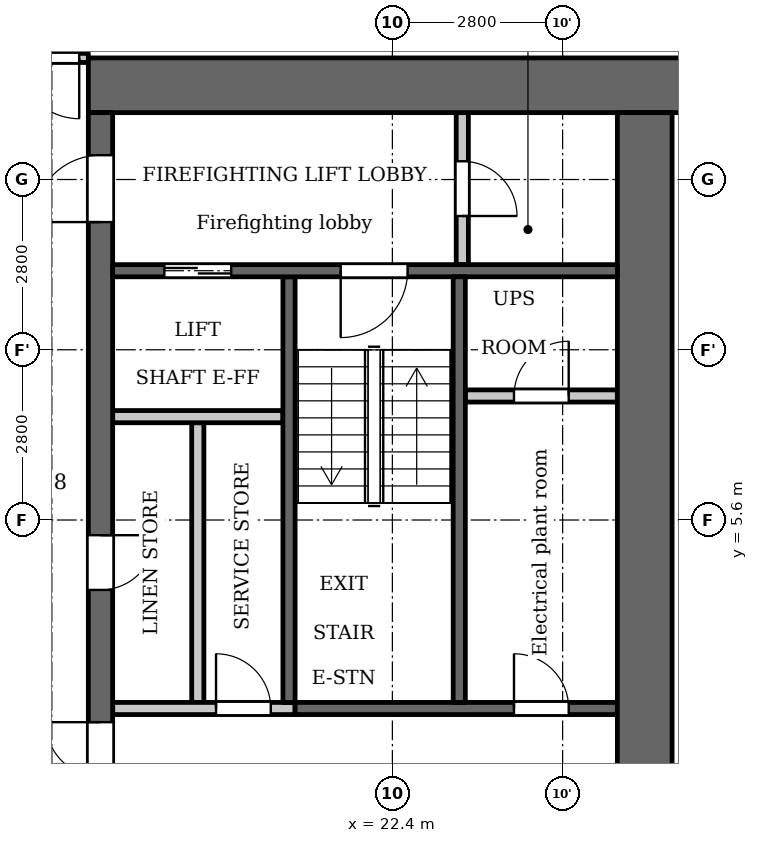
"""IFC4 building model, lengths in metres.
Left out: names, types, materials, properties, quantities, classifications, styles, units other than length and angle.
Written with IfcOpenShell. Run it as: python <this file> out.ifc"""

import sys

from ifc_helpers import new_model, si_unit, direction, frame, frame_2d, origin, place, context, subcontext, project, spatial, rectangle, extrude, element, fill, save


model = new_model("IFC4")
c1 = context("Model", 3, precision=1e-05, world=origin(), true_north=direction((0.0, 1.0)))
c2 = subcontext(c1, "Body", "Model", "MODEL_VIEW")
j1 = project(units=[si_unit("LENGTHUNIT", "METRE"), si_unit("PLANEANGLEUNIT", "RADIAN")], contexts=[c1])
p1 = place(None, origin())
s1 = spatial("IfcSite", under=j1, at=p1, CompositionType="ELEMENT")
p2 = place(p1, origin())
s2 = spatial("IfcBuilding", under=s1, at=p2, CompositionType="ELEMENT")
p3 = place(p2, frame((0.0, 0.0, 107.8)))
s3 = spatial("IfcBuildingStorey", under=s2, at=p3, CompositionType="ELEMENT", Elevation=107.8)
p4 = place(p3, frame((20.7, 2.6, 0.0), z_axis=(0.0, 0.0, 1.0), x_axis=(0.0, 1.0, 0.0)))
e1 = element("IfcWall", 1, at=p4, inside=s3, PredefinedType="SHEAR", context=c2, shape_type="SweptSolid", body=[
    extrude(rectangle(XDim=7.0, YDim=0.2, at=frame_2d((3.5, 0.0))), origin(), (0.0, 0.0, 1.0), 3.2),
])
p5 = place(p3, frame((20.8, 2.5, 0.0), z_axis=(0.0, 0.0, 1.0), x_axis=(1.0, 0.0, 0.0)))
e2 = element("IfcWall", 2, at=p5, inside=s3, PredefinedType="SHEAR", context=c2, shape_type="SweptSolid", body=[
    extrude(rectangle(XDim=5.3, YDim=0.2, at=frame_2d((2.65, 0.0))), origin(), (0.0, 0.0, 1.0), 3.2),
])
p6 = place(p5, frame((3.6, 0.0, 0.0)))
e3 = element("IfcOpeningElement", 3, at=p6, cuts=e2, PredefinedType="OPENING", context=c2, shape_type="SweptSolid", body=[
    extrude(rectangle(XDim=0.9, YDim=2.1, at=frame_2d((0.45, 1.05))), frame((0.0, 0.11, 0.0), z_axis=(0.0, -1.0, 0.0), x_axis=(1.0, 0.0, 0.0)), (0.0, 0.0, 1.0), 0.22),
])
p7 = place(p3, frame((17.4, 12.75, 0.0), z_axis=(0.0, 0.0, 1.0), x_axis=(1.0, 0.0, 0.0)))
e4 = element("IfcWall", 4, at=p7, inside=s3, PredefinedType="SHEAR", context=c2, shape_type="SweptSolid", body=[
    extrude(rectangle(XDim=10.4, YDim=0.9, at=frame_2d((5.2, 0.0))), origin(), (0.0, 0.0, 1.0), 3.2),
])
p8 = place(p3, frame((19.2, 2.6, 0.0), z_axis=(0.0, 0.0, 1.0), x_axis=(0.0, 1.0, 0.0)))
e5 = element("IfcWall", 5, at=p8, inside=s3, PredefinedType="PARTITIONING", context=c2, shape_type="SweptSolid", body=[
    extrude(rectangle(XDim=4.6, YDim=0.2, at=frame_2d((2.3, 0.0))), origin(), (0.0, 0.0, 1.0), 3.2),
])
p9 = place(p3, frame((17.6, -12.3, 0.0), z_axis=(0.0, 0.0, 1.0), x_axis=(0.0, 1.0, 0.0)))
e6 = element("IfcWall", 6, at=p9, inside=s3, PredefinedType="SHEAR", context=c2, shape_type="SweptSolid", body=[
    extrude(rectangle(XDim=24.6, YDim=0.4, at=frame_2d((12.3, 0.0))), origin(), (0.0, 0.0, 1.0), 3.2),
])
p10 = place(p9, frame((6.0, 0.0, 0.0)))
e7 = element("IfcOpeningElement", 7, at=p10, cuts=e6, PredefinedType="OPENING", context=c2, shape_type="SweptSolid", body=[
    extrude(rectangle(XDim=1.1, YDim=2.1, at=frame_2d((0.55, 1.05))), frame((0.0, 0.21, 0.0), z_axis=(0.0, -1.0, 0.0), x_axis=(1.0, 0.0, 0.0)), (0.0, 0.0, 1.0), 0.42),
])
p11 = place(p9, frame((8.4, 0.0, 0.0)))
e8 = element("IfcOpeningElement", 8, at=p11, cuts=e6, PredefinedType="OPENING", context=c2, shape_type="SweptSolid", body=[
    extrude(rectangle(XDim=1.1, YDim=2.1, at=frame_2d((0.55, 1.05))), frame((0.0, 0.21, 0.0), z_axis=(0.0, -1.0, 0.0), x_axis=(1.0, 0.0, 0.0)), (0.0, 0.0, 1.0), 0.42),
])
p12 = place(p9, frame((10.8, 0.0, 0.0)))
e9 = element("IfcOpeningElement", 9, at=p12, cuts=e6, PredefinedType="OPENING", context=c2, shape_type="SweptSolid", body=[
    extrude(rectangle(XDim=1.1, YDim=2.1, at=frame_2d((0.55, 1.05))), frame((0.0, 0.21, 0.0), z_axis=(0.0, -1.0, 0.0), x_axis=(1.0, 0.0, 0.0)), (0.0, 0.0, 1.0), 0.42),
])
p13 = place(p9, frame((16.75, 0.0, 0.0)))
e10 = element("IfcOpeningElement", 10, at=p13, cuts=e6, PredefinedType="OPENING", context=c2, shape_type="SweptSolid", body=[
    extrude(rectangle(XDim=0.9, YDim=2.1, at=frame_2d((0.45, 1.05))), frame((0.0, 0.21, 0.0), z_axis=(0.0, -1.0, 0.0), x_axis=(1.0, 0.0, 0.0)), (0.0, 0.0, 1.0), 0.42),
])
p14 = place(p9, frame((22.8, 0.0, 0.0)))
e11 = element("IfcOpeningElement", 11, at=p14, cuts=e6, PredefinedType="OPENING", context=c2, shape_type="SweptSolid", body=[
    extrude(rectangle(XDim=1.1, YDim=2.1, at=frame_2d((0.55, 1.05))), frame((0.0, 0.21, 0.0), z_axis=(0.0, -1.0, 0.0), x_axis=(1.0, 0.0, 0.0)), (0.0, 0.0, 1.0), 0.42),
])
p15 = place(p9, frame((0.7, 0.0, 0.0)))
e12 = element("IfcOpeningElement", 12, at=p15, cuts=e6, PredefinedType="OPENING", context=c2, shape_type="SweptSolid", body=[
    extrude(rectangle(XDim=1.1, YDim=2.1, at=frame_2d((0.55, 1.05))), frame((0.0, 0.21, 0.0), z_axis=(0.0, -1.0, 0.0), x_axis=(1.0, 0.0, 0.0)), (0.0, 0.0, 1.0), 0.42),
])
p16 = place(p9, frame((12.775, 0.0, 0.0)))
e13 = element("IfcOpeningElement", 13, at=p16, cuts=e6, PredefinedType="OPENING", context=c2, shape_type="SweptSolid", body=[
    extrude(rectangle(XDim=1.8, YDim=2.1, at=frame_2d((0.9, 1.05))), frame((0.0, 0.21, 0.0), z_axis=(0.0, -1.0, 0.0), x_axis=(1.0, 0.0, 0.0)), (0.0, 0.0, 1.0), 0.42),
])
p17 = place(p3, frame((26.55, -12.3, 0.0), z_axis=(0.0, 0.0, 1.0), x_axis=(0.0, 1.0, 0.0)))
e14 = element("IfcWall", 14, at=p17, inside=s3, PredefinedType="SHEAR", context=c2, shape_type="SweptSolid", body=[
    extrude(rectangle(XDim=24.6, YDim=0.9, at=frame_2d((12.3, 0.0))), origin(), (0.0, 0.0, 1.0), 3.2),
])
p18 = place(p3, frame((23.55, 9.8, 0.0), z_axis=(0.0, 0.0, 1.0), x_axis=(0.0, 1.0, 0.0)))
e15 = element("IfcWall", 15, at=p18, inside=s3, PredefinedType="PARTITIONING", context=c2, shape_type="SweptSolid", body=[
    extrude(rectangle(XDim=2.5, YDim=0.2, at=frame_2d((1.25, 0.0))), origin(), (0.0, 0.0, 1.0), 3.2),
])
p19 = place(p18, frame((0.8, 0.0, 0.0)))
e16 = element("IfcOpeningElement", 16, at=p19, cuts=e15, PredefinedType="OPENING", context=c2, shape_type="SweptSolid", body=[
    extrude(rectangle(XDim=0.9, YDim=2.1, at=frame_2d((0.45, 1.05))), frame((0.0, 0.11, 0.0), z_axis=(0.0, -1.0, 0.0), x_axis=(1.0, 0.0, 0.0)), (0.0, 0.0, 1.0), 0.22),
])
p20 = place(p3, frame((23.6, 7.64, 0.0), z_axis=(0.0, 0.0, 1.0), x_axis=(1.0, 0.0, 0.0)))
e17 = element("IfcWall", 17, at=p20, inside=s3, PredefinedType="PARTITIONING", context=c2, shape_type="SweptSolid", body=[
    extrude(rectangle(XDim=2.5, YDim=0.2, at=frame_2d((1.25, 0.0))), origin(), (0.0, 0.0, 1.0), 3.2),
])
p21 = place(p20, frame((0.8, 0.0, 0.0)))
e18 = element("IfcOpeningElement", 18, at=p21, cuts=e17, PredefinedType="OPENING", context=c2, shape_type="SweptSolid", body=[
    extrude(rectangle(XDim=0.9, YDim=2.1, at=frame_2d((0.45, 1.05))), frame((0.0, 0.11, 0.0), z_axis=(0.0, -1.0, 0.0), x_axis=(1.0, 0.0, 0.0)), (0.0, 0.0, 1.0), 0.22),
])
p22 = place(p3, frame((17.8, 2.5, 0.0), z_axis=(0.0, 0.0, 1.0), x_axis=(1.0, 0.0, 0.0)))
e19 = element("IfcWall", 19, at=p22, inside=s3, PredefinedType="PARTITIONING", context=c2, shape_type="SweptSolid", body=[
    extrude(rectangle(XDim=3.0, YDim=0.2, at=frame_2d((1.5, 0.0))), origin(), (0.0, 0.0, 1.0), 3.2),
])
p23 = place(p22, frame((1.7, 0.0, 0.0)))
e20 = element("IfcOpeningElement", 20, at=p23, cuts=e19, PredefinedType="OPENING", context=c2, shape_type="SweptSolid", body=[
    extrude(rectangle(XDim=0.9, YDim=2.1, at=frame_2d((0.45, 1.05))), frame((0.0, 0.11, 0.0), z_axis=(0.0, -1.0, 0.0), x_axis=(1.0, 0.0, 0.0)), (0.0, 0.0, 1.0), 0.22),
])
p24 = place(p3, frame((17.8, 7.3, 0.0), z_axis=(0.0, 0.0, 1.0), x_axis=(1.0, 0.0, 0.0)))
e21 = element("IfcWall", 21, at=p24, inside=s3, PredefinedType="PARTITIONING", context=c2, shape_type="SweptSolid", body=[
    extrude(rectangle(XDim=2.8, YDim=0.2, at=frame_2d((1.4, 0.0))), origin(), (0.0, 0.0, 1.0), 3.2),
])
p25 = place(p3, frame((17.8, 9.7, 0.0), z_axis=(0.0, 0.0, 1.0), x_axis=(1.0, 0.0, 0.0)))
e22 = element("IfcWall", 22, at=p25, inside=s3, PredefinedType="SHEAR", context=c2, shape_type="SweptSolid", body=[
    extrude(rectangle(XDim=8.3, YDim=0.2, at=frame_2d((4.15, 0.0))), origin(), (0.0, 0.0, 1.0), 3.2),
])
p26 = place(p25, frame((0.85, 0.0, 0.0)))
e23 = element("IfcOpeningElement", 23, at=p26, cuts=e22, PredefinedType="OPENING", context=c2, shape_type="SweptSolid", body=[
    extrude(rectangle(XDim=1.1, YDim=2.1, at=frame_2d((0.55, 1.05))), frame((0.0, 0.11, 0.0), z_axis=(0.0, -1.0, 0.0), x_axis=(1.0, 0.0, 0.0)), (0.0, 0.0, 1.0), 0.22),
])
p27 = place(p25, frame((3.75, 0.0, 0.0)))
e24 = element("IfcOpeningElement", 24, at=p27, cuts=e22, PredefinedType="OPENING", context=c2, shape_type="SweptSolid", body=[
    extrude(rectangle(XDim=1.1, YDim=2.1, at=frame_2d((0.55, 1.05))), frame((0.0, 0.11, 0.0), z_axis=(0.0, -1.0, 0.0), x_axis=(1.0, 0.0, 0.0)), (0.0, 0.0, 1.0), 0.22),
])
p28 = place(p3, frame((23.5, 2.6, 0.0), z_axis=(0.0, 0.0, 1.0), x_axis=(0.0, 1.0, 0.0)))
e25 = element("IfcWall", 25, at=p28, inside=s3, PredefinedType="SHEAR", context=c2, shape_type="SweptSolid", body=[
    extrude(rectangle(XDim=7.0, YDim=0.2, at=frame_2d((3.5, 0.0))), origin(), (0.0, 0.0, 1.0), 3.2),
])
p29 = place(p3, frame((-17.4, 13.2, 0.0), z_axis=(0.0, 0.0, 1.0), x_axis=(1.0, 0.0, 0.0)))
e26 = element("IfcWall", 26, at=p29, inside=s3, PredefinedType="PARTITIONING", context=c2, shape_type="SweptSolid", body=[
    extrude(rectangle(XDim=34.8, YDim=0.15, at=frame_2d((17.4, 0.0))), origin(), (0.0, 0.0, 1.0), 3.2),
])
p30 = place(p29, frame((0.25, 0.0, 0.0)))
e27 = element("IfcOpeningElement", 27, at=p30, cuts=e26, PredefinedType="OPENING", context=c2, shape_type="SweptSolid", body=[
    extrude(rectangle(XDim=1.0, YDim=2.1, at=frame_2d((0.5, 1.05))), frame((0.0, 0.085, 0.0), z_axis=(0.0, -1.0, 0.0), x_axis=(1.0, 0.0, 0.0)), (0.0, 0.0, 1.0), 0.17),
])
p31 = place(p29, frame((33.65, 0.0, 0.0)))
e28 = element("IfcOpeningElement", 28, at=p31, cuts=e26, PredefinedType="OPENING", context=c2, shape_type="SweptSolid", body=[
    extrude(rectangle(XDim=1.0, YDim=2.1, at=frame_2d((0.5, 1.05))), frame((0.0, 0.085, 0.0), z_axis=(0.0, -1.0, 0.0), x_axis=(1.0, 0.0, 0.0)), (0.0, 0.0, 1.0), 0.17),
])
p32 = place(p29, frame((4.55, 0.0, 0.0)))
e29 = element("IfcOpeningElement", 29, at=p32, cuts=e26, PredefinedType="OPENING", context=c2, shape_type="SweptSolid", body=[
    extrude(rectangle(XDim=1.0, YDim=2.1, at=frame_2d((0.5, 1.05))), frame((0.0, 0.085, 0.0), z_axis=(0.0, -1.0, 0.0), x_axis=(1.0, 0.0, 0.0)), (0.0, 0.0, 1.0), 0.17),
])
p33 = place(p29, frame((6.85, 0.0, 0.0)))
e30 = element("IfcOpeningElement", 30, at=p33, cuts=e26, PredefinedType="OPENING", context=c2, shape_type="SweptSolid", body=[
    extrude(rectangle(XDim=1.0, YDim=2.1, at=frame_2d((0.5, 1.05))), frame((0.0, 0.085, 0.0), z_axis=(0.0, -1.0, 0.0), x_axis=(1.0, 0.0, 0.0)), (0.0, 0.0, 1.0), 0.17),
])
p34 = place(p29, frame((12.5, 0.0, 0.0)))
e31 = element("IfcOpeningElement", 31, at=p34, cuts=e26, PredefinedType="OPENING", context=c2, shape_type="SweptSolid", body=[
    extrude(rectangle(XDim=1.0, YDim=2.1, at=frame_2d((0.5, 1.05))), frame((0.0, 0.085, 0.0), z_axis=(0.0, -1.0, 0.0), x_axis=(1.0, 0.0, 0.0)), (0.0, 0.0, 1.0), 0.17),
])
p35 = place(p29, frame((25.7, 0.0, 0.0)))
e32 = element("IfcOpeningElement", 32, at=p35, cuts=e26, PredefinedType="OPENING", context=c2, shape_type="SweptSolid", body=[
    extrude(rectangle(XDim=1.0, YDim=2.1, at=frame_2d((0.5, 1.05))), frame((0.0, 0.085, 0.0), z_axis=(0.0, -1.0, 0.0), x_axis=(1.0, 0.0, 0.0)), (0.0, 0.0, 1.0), 0.17),
])
p36 = place(p29, frame((29.75, 0.0, 0.0)))
e33 = element("IfcOpeningElement", 33, at=p36, cuts=e26, PredefinedType="OPENING", context=c2, shape_type="SweptSolid", body=[
    extrude(rectangle(XDim=1.0, YDim=2.1, at=frame_2d((0.5, 1.05))), frame((0.0, 0.085, 0.0), z_axis=(0.0, -1.0, 0.0), x_axis=(1.0, 0.0, 0.0)), (0.0, 0.0, 1.0), 0.17),
])
p37 = place(p13, origin())
e34 = element("IfcDoor", 34, at=p37, inside=s3, OperationType="SINGLE_SWING_RIGHT", PredefinedType="DOOR", context=c2, shape_type="SweptSolid", body=[
    extrude(rectangle(XDim=0.9, YDim=2.1, at=frame_2d((0.45, 1.05))), frame((0.0, 0.025, 0.0), z_axis=(0.0, -1.0, 0.0), x_axis=(1.0, 0.0, 0.0)), (0.0, 0.0, 1.0), 0.05),
])
fill(e10, e34)
p38 = place(p23, origin())
e35 = element("IfcDoor", 35, at=p38, inside=s3, OperationType="SINGLE_SWING_RIGHT", PredefinedType="DOOR", context=c2, shape_type="SweptSolid", body=[
    extrude(rectangle(XDim=0.9, YDim=2.1, at=frame_2d((0.45, 1.05))), frame((0.0, 0.025, 0.0), z_axis=(0.0, -1.0, 0.0), x_axis=(1.0, 0.0, 0.0)), (0.0, 0.0, 1.0), 0.05),
])
fill(e20, e35)
p39 = place(p26, origin())
e36 = element("IfcDoor", 36, at=p39, inside=s3, OperationType="DOUBLE_DOOR_SLIDING", PredefinedType="DOOR", context=c2, shape_type="SweptSolid", body=[
    extrude(rectangle(XDim=1.1, YDim=2.1, at=frame_2d((0.55, 1.05))), frame((0.0, 0.025, 0.0), z_axis=(0.0, -1.0, 0.0), x_axis=(1.0, 0.0, 0.0)), (0.0, 0.0, 1.0), 0.05),
])
fill(e23, e36)
p40 = place(p14, origin())
e37 = element("IfcDoor", 37, at=p40, inside=s3, OperationType="SINGLE_SWING_RIGHT", PredefinedType="DOOR", context=c2, shape_type="SweptSolid", body=[
    extrude(rectangle(XDim=1.1, YDim=2.1, at=frame_2d((0.55, 1.05))), frame((0.0, 0.025, 0.0), z_axis=(0.0, -1.0, 0.0), x_axis=(1.0, 0.0, 0.0)), (0.0, 0.0, 1.0), 0.05),
])
fill(e11, e37)
p41 = place(p19, origin())
e38 = element("IfcDoor", 38, at=p41, inside=s3, OperationType="SINGLE_SWING_LEFT", PredefinedType="DOOR", context=c2, shape_type="SweptSolid", body=[
    extrude(rectangle(XDim=0.9, YDim=2.1, at=frame_2d((0.45, 1.05))), frame((0.0, 0.025, 0.0), z_axis=(0.0, -1.0, 0.0), x_axis=(1.0, 0.0, 0.0)), (0.0, 0.0, 1.0), 0.05),
])
fill(e16, e38)
p42 = place(p27, origin())
e39 = element("IfcDoor", 39, at=p42, inside=s3, OperationType="SINGLE_SWING_LEFT", PredefinedType="DOOR", context=c2, shape_type="SweptSolid", body=[
    extrude(rectangle(XDim=1.1, YDim=2.1, at=frame_2d((0.55, 1.05))), frame((0.0, 0.025, 0.0), z_axis=(0.0, -1.0, 0.0), x_axis=(1.0, 0.0, 0.0)), (0.0, 0.0, 1.0), 0.05),
])
fill(e24, e39)
p43 = place(p16, origin())
e40 = element("IfcDoor", 40, at=p43, inside=s3, OperationType="DOUBLE_DOOR_SINGLE_SWING", PredefinedType="DOOR", context=c2, shape_type="SweptSolid", body=[
    extrude(rectangle(XDim=1.8, YDim=2.1, at=frame_2d((0.9, 1.05))), frame((0.0, 0.025, 0.0), z_axis=(0.0, -1.0, 0.0), x_axis=(1.0, 0.0, 0.0)), (0.0, 0.0, 1.0), 0.05),
])
fill(e13, e40)
p44 = place(p21, origin())
e41 = element("IfcDoor", 41, at=p44, inside=s3, OperationType="SINGLE_SWING_LEFT", PredefinedType="DOOR", context=c2, shape_type="SweptSolid", body=[
    extrude(rectangle(XDim=0.9, YDim=2.1, at=frame_2d((0.45, 1.05))), frame((0.0, 0.025, 0.0), z_axis=(0.0, -1.0, 0.0), x_axis=(1.0, 0.0, 0.0)), (0.0, 0.0, 1.0), 0.05),
])
fill(e18, e41)
p45 = place(p6, origin())
e42 = element("IfcDoor", 42, at=p45, inside=s3, OperationType="SINGLE_SWING_RIGHT", PredefinedType="DOOR", context=c2, shape_type="SweptSolid", body=[
    extrude(rectangle(XDim=0.9, YDim=2.1, at=frame_2d((0.45, 1.05))), frame((0.0, 0.025, 0.0), z_axis=(0.0, -1.0, 0.0), x_axis=(1.0, 0.0, 0.0)), (0.0, 0.0, 1.0), 0.05),
])
fill(e3, e42)
p46 = place(p31, origin())
e43 = element("IfcDoor", 43, at=p46, inside=s3, OperationType="SINGLE_SWING_RIGHT", PredefinedType="DOOR", context=c2, shape_type="SweptSolid", body=[
    extrude(rectangle(XDim=1.0, YDim=2.1, at=frame_2d((0.5, 1.05))), frame((0.0, 0.025, 0.0), z_axis=(0.0, -1.0, 0.0), x_axis=(1.0, 0.0, 0.0)), (0.0, 0.0, 1.0), 0.05),
])
fill(e28, e43)
save(model, sys.argv[1])
